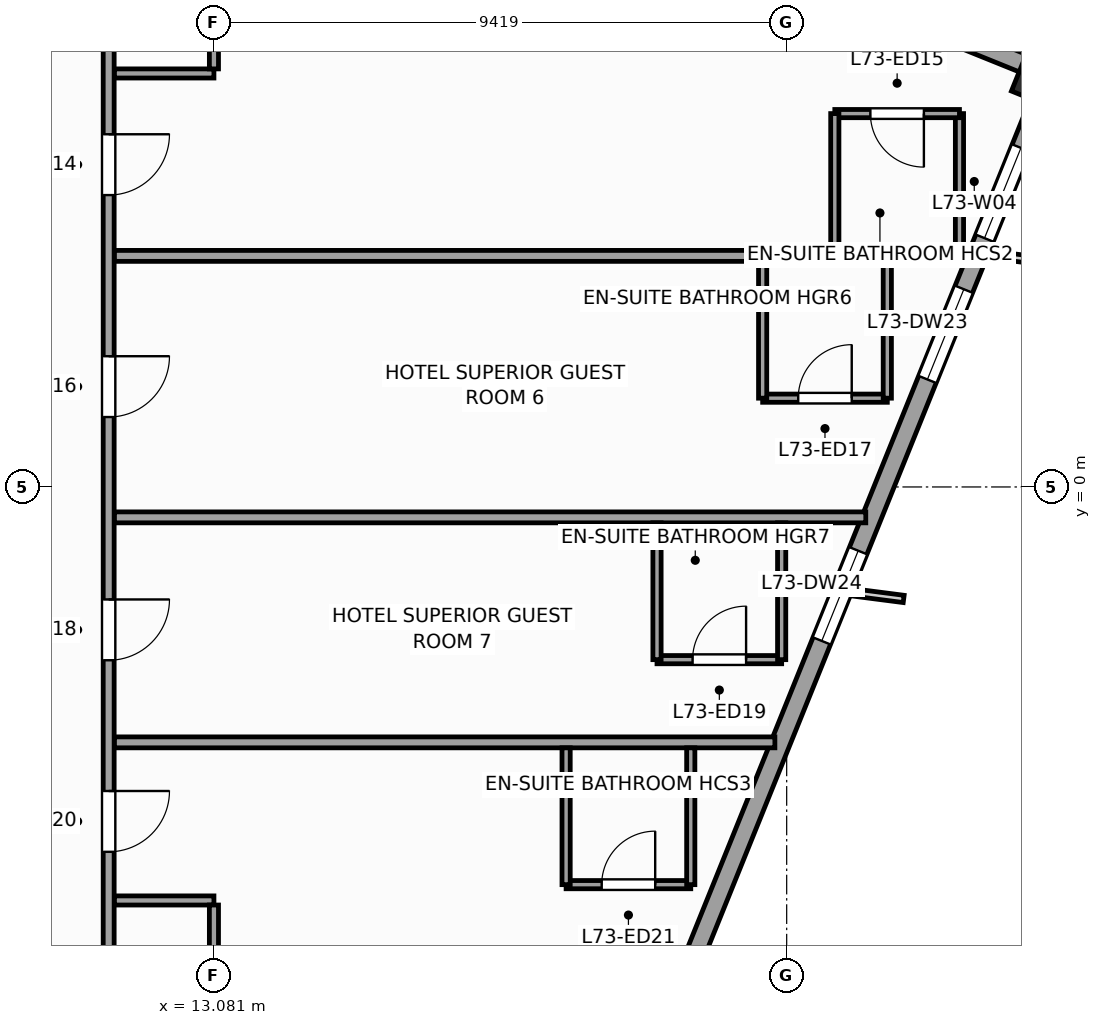
"""IFC4 building model, lengths in metres.
Left out: names, types, materials, properties, quantities, classifications, styles, units other than length and angle.
Written with IfcOpenShell. Run it as: python <this file> out.ifc"""

import sys

from ifc_helpers import new_model, si_unit, direction, frame, frame_2d, origin, origin_2d, place, context, subcontext, project, spatial, rectangle, extrude, source, transform, mapped, element, fill, save


model = new_model("IFC4")
c1 = context("Model", 3, precision=1e-05, world=origin(), true_north=direction((0.0, 1.0)))
c2 = subcontext(c1, "Body", "Model", "MODEL_VIEW")
j1 = project(units=[si_unit("LENGTHUNIT", "METRE"), si_unit("PLANEANGLEUNIT", "RADIAN")], contexts=[c1])
p1 = place(None, origin())
s1 = spatial("IfcSite", under=j1, at=p1, CompositionType="ELEMENT")
p2 = place(p1, origin())
s2 = spatial("IfcBuilding", under=s1, at=p2, CompositionType="ELEMENT")
p3 = place(p2, frame((0.0, 0.0, 297.6)))
s3 = spatial("IfcBuildingStorey", under=s2, at=p3, CompositionType="ELEMENT", Elevation=297.6)
m1 = source(origin(), c2, "Body", "SweptSolid", [
    extrude(rectangle(XDim=0.65, YDim=0.65, at=origin_2d()), origin(), (0.0, 0.0, 1.0), 3.6),
])
p4 = place(p3, frame((26.62, 6.69, 0.0), z_axis=(0.0, 0.0, 1.0), x_axis=(0.374606593416, 0.927183854567, 0.0)))
e1 = element("IfcColumn", 1, at=p4, inside=s3, PredefinedType="COLUMN", context=c2, shape_type="MappedRepresentation", body=[
    mapped(m1, transform((0.0, 0.0, 0.0), scale=1.0)),
])
p5 = place(p3, frame((14.479, -23.813, 0.0), z_axis=(0.0, 0.0, 1.0), x_axis=(0.374609557019, 0.927182657188, 0.0)))
e2 = element("IfcWall", 2, at=p5, inside=s3, PredefinedType="STANDARD", context=c2, shape_type="SweptSolid", body=[
    extrude(rectangle(XDim=33.31, YDim=0.31, at=frame_2d((16.655, 0.0))), origin(), (0.0, 0.0, 1.0), 2.75),
])
p6 = place(p5, frame((3.197, 0.0, 0.47)))
e3 = element("IfcOpeningElement", 3, at=p6, cuts=e2, PredefinedType="OPENING", context=c2, shape_type="SweptSolid", body=[
    extrude(rectangle(XDim=1.6, YDim=2.1, at=frame_2d((0.8, 1.05))), frame((0.0, 0.165, 0.0), z_axis=(0.0, -1.0, 0.0), x_axis=(1.0, 0.0, 0.0)), (0.0, 0.0, 1.0), 0.33),
])
p7 = place(p5, frame((8.86, 0.0, 0.47)))
e4 = element("IfcOpeningElement", 4, at=p7, cuts=e2, PredefinedType="OPENING", context=c2, shape_type="SweptSolid", body=[
    extrude(rectangle(XDim=1.6, YDim=2.1, at=frame_2d((0.8, 1.05))), frame((0.0, 0.165, 0.0), z_axis=(0.0, -1.0, 0.0), x_axis=(1.0, 0.0, 0.0)), (0.0, 0.0, 1.0), 0.33),
])
p8 = place(p5, frame((14.439, 0.0, 0.47)))
e5 = element("IfcOpeningElement", 5, at=p8, cuts=e2, PredefinedType="OPENING", context=c2, shape_type="SweptSolid", body=[
    extrude(rectangle(XDim=1.6, YDim=2.1, at=frame_2d((0.8, 1.05))), frame((0.0, 0.165, 0.0), z_axis=(0.0, -1.0, 0.0), x_axis=(1.0, 0.0, 0.0)), (0.0, 0.0, 1.0), 0.33),
])
p9 = place(p5, frame((30.097, 0.0, 0.47)))
e6 = element("IfcOpeningElement", 6, at=p9, cuts=e2, PredefinedType="OPENING", context=c2, shape_type="SweptSolid", body=[
    extrude(rectangle(XDim=1.6, YDim=2.1, at=frame_2d((0.8, 1.05))), frame((0.0, 0.165, 0.0), z_axis=(0.0, -1.0, 0.0), x_axis=(1.0, 0.0, 0.0)), (0.0, 0.0, 1.0), 0.33),
])
p10 = place(p5, frame((27.59, 0.0, 0.47)))
e7 = element("IfcOpeningElement", 7, at=p10, cuts=e2, PredefinedType="OPENING", context=c2, shape_type="SweptSolid", body=[
    extrude(rectangle(XDim=1.6, YDim=2.1, at=frame_2d((0.8, 1.05))), frame((0.0, 0.165, 0.0), z_axis=(0.0, -1.0, 0.0), x_axis=(1.0, 0.0, 0.0)), (0.0, 0.0, 1.0), 0.33),
])
p11 = place(p5, frame((22.952, 0.0, 0.47)))
e8 = element("IfcOpeningElement", 8, at=p11, cuts=e2, PredefinedType="OPENING", context=c2, shape_type="SweptSolid", body=[
    extrude(rectangle(XDim=1.6, YDim=2.1, at=frame_2d((0.8, 1.05))), frame((0.0, 0.165, 0.0), z_axis=(0.0, -1.0, 0.0), x_axis=(1.0, 0.0, 0.0)), (0.0, 0.0, 1.0), 0.33),
])
p12 = place(p3, frame((26.841, 6.784, 0.0), z_axis=(0.0, 0.0, 1.0), x_axis=(-0.927171722085, 0.374636620962, 0.0)))
e9 = element("IfcWall", 9, at=p12, inside=s3, PredefinedType="STANDARD", context=c2, shape_type="SweptSolid", body=[
    extrude(rectangle(XDim=6.0, YDim=0.31, at=frame_2d((3.0, 0.0))), origin(), (0.0, 0.0, 1.0), 2.65),
])
p13 = place(p3, frame((11.35, -12.35, 0.0), z_axis=(0.0, 0.0, 1.0), x_axis=(0.0, 1.0, 0.0)))
e10 = element("IfcWall", 10, at=p13, inside=s3, PredefinedType="PARTITIONING", context=c2, shape_type="SweptSolid", body=[
    extrude(rectangle(XDim=22.55, YDim=0.18, at=frame_2d((11.275, 0.0))), origin(), (0.0, 0.0, 1.0), 3.35),
])
p14 = place(p13, frame((17.15, 0.0, 0.0)))
e11 = element("IfcOpeningElement", 11, at=p14, cuts=e10, PredefinedType="OPENING", context=c2, shape_type="SweptSolid", body=[
    extrude(rectangle(XDim=1.0, YDim=2.15, at=frame_2d((0.5, 1.075))), frame((0.0, 0.1, 0.0), z_axis=(0.0, -1.0, 0.0), x_axis=(1.0, 0.0, 0.0)), (0.0, 0.0, 1.0), 0.2),
])
p15 = place(p13, frame((13.5, 0.0, 0.0)))
e12 = element("IfcOpeningElement", 12, at=p15, cuts=e10, PredefinedType="OPENING", context=c2, shape_type="SweptSolid", body=[
    extrude(rectangle(XDim=1.0, YDim=2.15, at=frame_2d((0.5, 1.075))), frame((0.0, 0.1, 0.0), z_axis=(0.0, -1.0, 0.0), x_axis=(1.0, 0.0, 0.0)), (0.0, 0.0, 1.0), 0.2),
])
p16 = place(p13, frame((9.5, 0.0, 0.0)))
e13 = element("IfcOpeningElement", 13, at=p16, cuts=e10, PredefinedType="OPENING", context=c2, shape_type="SweptSolid", body=[
    extrude(rectangle(XDim=1.0, YDim=2.15, at=frame_2d((0.5, 1.075))), frame((0.0, 0.1, 0.0), z_axis=(0.0, -1.0, 0.0), x_axis=(1.0, 0.0, 0.0)), (0.0, 0.0, 1.0), 0.2),
])
p17 = place(p13, frame((6.35, 0.0, 0.0)))
e14 = element("IfcOpeningElement", 14, at=p17, cuts=e10, PredefinedType="OPENING", context=c2, shape_type="SweptSolid", body=[
    extrude(rectangle(XDim=1.0, YDim=2.15, at=frame_2d((0.5, 1.075))), frame((0.0, 0.1, 0.0), z_axis=(0.0, -1.0, 0.0), x_axis=(1.0, 0.0, 0.0)), (0.0, 0.0, 1.0), 0.2),
])
p18 = place(p13, frame((2.439, 0.0, 0.0)))
e15 = element("IfcOpeningElement", 15, at=p18, cuts=e10, PredefinedType="OPENING", context=c2, shape_type="SweptSolid", body=[
    extrude(rectangle(XDim=1.0, YDim=2.15, at=frame_2d((0.5, 1.075))), frame((0.0, 0.1, 0.0), z_axis=(0.0, -1.0, 0.0), x_axis=(1.0, 0.0, 0.0)), (0.0, 0.0, 1.0), 0.2),
])
p19 = place(p3, frame((11.445, 3.8, 0.0), z_axis=(0.0, 0.0, 1.0), x_axis=(1.0, 0.0, 0.0)))
e16 = element("IfcWall", 16, at=p19, inside=s3, PredefinedType="PARTITIONING", context=c2, shape_type="SweptSolid", body=[
    extrude(rectangle(XDim=14.093, YDim=0.18, at=frame_2d((7.046, 0.0))), origin(), (0.0, 0.0, 1.0), 3.35),
])
p20 = place(p3, frame((11.445, -0.5, 0.0), z_axis=(0.0, 0.0, 1.0), x_axis=(1.0, 0.0, 0.0)))
e17 = element("IfcWall", 17, at=p20, inside=s3, PredefinedType="PARTITIONING", context=c2, shape_type="SweptSolid", body=[
    extrude(rectangle(XDim=12.356, YDim=0.18, at=frame_2d((6.178, 0.0))), origin(), (0.0, 0.0, 1.0), 3.02),
])
p21 = place(p3, frame((11.445, -4.2, 0.0), z_axis=(0.0, 0.0, 1.0), x_axis=(1.0, 0.0, 0.0)))
e18 = element("IfcWall", 18, at=p21, inside=s3, PredefinedType="PARTITIONING", context=c2, shape_type="SweptSolid", body=[
    extrude(rectangle(XDim=10.861, YDim=0.18, at=frame_2d((5.43, 0.0))), origin(), (0.0, 0.0, 1.0), 3.02),
])
p22 = place(p3, frame((11.445, 6.8, 0.0), z_axis=(0.0, 0.0, 1.0), x_axis=(1.0, 0.0, 0.0)))
e19 = element("IfcWall", 19, at=p22, inside=s3, PredefinedType="PARTITIONING", context=c2, shape_type="SweptSolid", body=[
    extrude(rectangle(XDim=1.636, YDim=0.15, at=frame_2d((0.818, 0.0))), origin(), (0.0, 0.0, 1.0), 3.35),
])
p23 = place(p3, frame((13.081, 6.875, 0.0), z_axis=(0.0, 0.0, 1.0), x_axis=(0.0, 1.0, 0.0)))
e20 = element("IfcWall", 20, at=p23, inside=s3, PredefinedType="PARTITIONING", context=c2, shape_type="SweptSolid", body=[
    extrude(rectangle(XDim=11.843, YDim=0.15, at=frame_2d((5.921, 0.0))), origin(), (0.0, 0.0, 1.0), 2.45),
])
p24 = place(p3, frame((11.445, -6.8, 0.0), z_axis=(0.0, 0.0, 1.0), x_axis=(1.0, 0.0, 0.0)))
e21 = element("IfcWall", 21, at=p24, inside=s3, PredefinedType="PARTITIONING", context=c2, shape_type="SweptSolid", body=[
    extrude(rectangle(XDim=1.636, YDim=0.15, at=frame_2d((0.818, 0.0))), origin(), (0.0, 0.0, 1.0), 3.35),
])
p25 = place(p3, frame((13.081, -6.875, 0.0), z_axis=(0.0, 0.0, 1.0), x_axis=(0.0, -1.0, 0.0)))
e22 = element("IfcWall", 22, at=p25, inside=s3, PredefinedType="PARTITIONING", context=c2, shape_type="SweptSolid", body=[
    extrude(rectangle(XDim=15.942, YDim=0.15, at=frame_2d((7.971, 0.0))), origin(), (0.0, 0.0, 1.0), 2.45),
])
p26 = place(p3, frame((25.342, 3.89, 0.0), z_axis=(0.0, 0.0, 1.0), x_axis=(0.0, 1.0, 0.0)))
e23 = element("IfcWall", 23, at=p26, inside=s3, PredefinedType="PARTITIONING", context=c2, shape_type="SweptSolid", body=[
    extrude(rectangle(XDim=2.25, YDim=0.135, at=frame_2d((1.125, 0.0))), origin(), (0.0, 0.0, 1.0), 2.75),
])
p27 = place(p3, frame((23.292, 6.14, 0.0), z_axis=(0.0, 0.0, 1.0), x_axis=(1.0, 0.0, 0.0)))
e24 = element("IfcWall", 24, at=p27, inside=s3, PredefinedType="PARTITIONING", context=c2, shape_type="SweptSolid", body=[
    extrude(rectangle(XDim=2.05, YDim=0.135, at=frame_2d((1.025, 0.0))), origin(), (0.0, 0.0, 1.0), 3.35),
])
p28 = place(p27, frame((0.585, 0.0, 0.0)))
e25 = element("IfcOpeningElement", 25, at=p28, cuts=e24, PredefinedType="OPENING", context=c2, shape_type="SweptSolid", body=[
    extrude(rectangle(XDim=0.88, YDim=2.1, at=frame_2d((0.44, 1.05))), frame((0.0, 0.078, 0.0), z_axis=(0.0, -1.0, 0.0), x_axis=(1.0, 0.0, 0.0)), (0.0, 0.0, 1.0), 0.155),
])
p29 = place(p3, frame((23.292, 3.89, 0.0), z_axis=(0.0, 0.0, 1.0), x_axis=(0.0, 1.0, 0.0)))
e26 = element("IfcWall", 26, at=p29, inside=s3, PredefinedType="PARTITIONING", context=c2, shape_type="SweptSolid", body=[
    extrude(rectangle(XDim=2.25, YDim=0.135, at=frame_2d((1.125, 0.0))), origin(), (0.0, 0.0, 1.0), 2.95),
])
p30 = place(p3, frame((22.105, 1.46, 0.0), z_axis=(0.0, 0.0, 1.0), x_axis=(1.0, 0.0, 0.0)))
e27 = element("IfcWall", 27, at=p30, inside=s3, PredefinedType="PARTITIONING", context=c2, shape_type="SweptSolid", body=[
    extrude(rectangle(XDim=2.05, YDim=0.135, at=frame_2d((1.025, 0.0))), origin(), (0.0, 0.0, 1.0), 3.35),
])
p31 = place(p30, frame((0.585, 0.0, 0.0)))
e28 = element("IfcOpeningElement", 28, at=p31, cuts=e27, PredefinedType="OPENING", context=c2, shape_type="SweptSolid", body=[
    extrude(rectangle(XDim=0.88, YDim=2.1, at=frame_2d((0.44, 1.05))), frame((0.0, 0.078, 0.0), z_axis=(0.0, -1.0, 0.0), x_axis=(1.0, 0.0, 0.0)), (0.0, 0.0, 1.0), 0.155),
])
for number, where, z_axis, x_axis in (
    (29, (24.155, 1.46, 0.0), (0.0, 0.0, 1.0), (0.0, 1.0, 0.0)),
    (30, (22.105, 1.46, 0.0), (0.0, 0.0, 1.0), (0.0, 1.0, 0.0)),
):
    element("IfcWall", number, at=place(p3, frame(where, z_axis=z_axis, x_axis=x_axis)), inside=s3, PredefinedType="PARTITIONING", context=c2, shape_type="SweptSolid", body=[
        extrude(rectangle(XDim=2.25, YDim=0.135, at=frame_2d((1.125, 0.0))), origin(), (0.0, 0.0, 1.0), 3.35),
    ])
p32 = place(p3, frame((20.367, -2.84, 0.0), z_axis=(0.0, 0.0, 1.0), x_axis=(1.0, 0.0, 0.0)))
e31 = element("IfcWall", 31, at=p32, inside=s3, PredefinedType="PARTITIONING", context=c2, shape_type="SweptSolid", body=[
    extrude(rectangle(XDim=2.05, YDim=0.135, at=frame_2d((1.025, 0.0))), origin(), (0.0, 0.0, 1.0), 3.35),
])
p33 = place(p32, frame((0.585, 0.0, 0.0)))
e32 = element("IfcOpeningElement", 32, at=p33, cuts=e31, PredefinedType="OPENING", context=c2, shape_type="SweptSolid", body=[
    extrude(rectangle(XDim=0.88, YDim=2.1, at=frame_2d((0.44, 1.05))), frame((0.0, 0.078, 0.0), z_axis=(0.0, -1.0, 0.0), x_axis=(1.0, 0.0, 0.0)), (0.0, 0.0, 1.0), 0.155),
])
for number, where, z_axis, x_axis in (
    (33, (22.417, -2.84, 0.0), (0.0, 0.0, 1.0), (0.0, 1.0, 0.0)),
    (34, (20.367, -2.84, 0.0), (0.0, 0.0, 1.0), (0.0, 1.0, 0.0)),
):
    element("IfcWall", number, at=place(p3, frame(where, z_axis=z_axis, x_axis=x_axis)), inside=s3, PredefinedType="PARTITIONING", context=c2, shape_type="SweptSolid", body=[
        extrude(rectangle(XDim=2.25, YDim=0.135, at=frame_2d((1.125, 0.0))), origin(), (0.0, 0.0, 1.0), 3.35),
    ])
p34 = place(p3, frame((18.873, -6.54, 0.0), z_axis=(0.0, 0.0, 1.0), x_axis=(1.0, 0.0, 0.0)))
e35 = element("IfcWall", 35, at=p34, inside=s3, PredefinedType="PARTITIONING", context=c2, shape_type="SweptSolid", body=[
    extrude(rectangle(XDim=2.05, YDim=0.135, at=frame_2d((1.025, 0.0))), origin(), (0.0, 0.0, 1.0), 3.35),
])
p35 = place(p34, frame((0.585, 0.0, 0.0)))
e36 = element("IfcOpeningElement", 36, at=p35, cuts=e35, PredefinedType="OPENING", context=c2, shape_type="SweptSolid", body=[
    extrude(rectangle(XDim=0.88, YDim=2.1, at=frame_2d((0.44, 1.05))), frame((0.0, 0.078, 0.0), z_axis=(0.0, -1.0, 0.0), x_axis=(1.0, 0.0, 0.0)), (0.0, 0.0, 1.0), 0.155),
])
for number, where, z_axis, x_axis in (
    (37, (20.923, -6.54, 0.0), (0.0, 0.0, 1.0), (0.0, 1.0, 0.0)),
    (38, (18.873, -6.54, 0.0), (0.0, 0.0, 1.0), (0.0, 1.0, 0.0)),
):
    element("IfcWall", number, at=place(p3, frame(where, z_axis=z_axis, x_axis=x_axis)), inside=s3, PredefinedType="PARTITIONING", context=c2, shape_type="SweptSolid", body=[
        extrude(rectangle(XDim=2.25, YDim=0.135, at=frame_2d((1.125, 0.0))), origin(), (0.0, 0.0, 1.0), 3.35),
    ])
m2 = source(origin(), c2, "Body", "SweptSolid", [
    extrude(rectangle(XDim=1.6, YDim=2.1, at=frame_2d((0.8, 1.05))), frame((0.0, 0.03, 0.0), z_axis=(0.0, -1.0, 0.0), x_axis=(1.0, 0.0, 0.0)), (0.0, 0.0, 1.0), 0.06),
])
p36 = place(p9, origin())
e39 = element("IfcWindow", 39, at=p36, inside=s3, PartitioningType="SINGLE_PANEL", PredefinedType="WINDOW", context=c2, shape_type="MappedRepresentation", body=[
    mapped(m2, transform((0.0, 0.0, 0.0), scale=1.0)),
])
fill(e6, e39)
m3 = source(origin(), c2, "Body", "SweptSolid", [
    extrude(rectangle(XDim=1.0, YDim=2.15, at=frame_2d((0.5, 1.075))), frame((0.0, 0.025, 0.0), z_axis=(0.0, -1.0, 0.0), x_axis=(1.0, 0.0, 0.0)), (0.0, 0.0, 1.0), 0.05),
])
p37 = place(p14, frame((1.0, 0.0, 0.0), z_axis=(0.0, 0.0, 1.0), x_axis=(-1.0, 0.0, 0.0)))
e40 = element("IfcDoor", 40, at=p37, inside=s3, OperationType="SINGLE_SWING_RIGHT", PredefinedType="DOOR", context=c2, shape_type="MappedRepresentation", body=[
    mapped(m3, transform((0.0, 0.0, 0.0), scale=1.0)),
])
fill(e11, e40)
m4 = source(origin(), c2, "Body", "SweptSolid", [
    extrude(rectangle(XDim=0.88, YDim=2.1, at=frame_2d((0.44, 1.05))), frame((0.0, 0.025, 0.0), z_axis=(0.0, -1.0, 0.0), x_axis=(1.0, 0.0, 0.0)), (0.0, 0.0, 1.0), 0.05),
])
p38 = place(p28, frame((0.88, 0.0, 0.0), z_axis=(0.0, 0.0, 1.0), x_axis=(-1.0, 0.0, 0.0)))
e41 = element("IfcDoor", 41, at=p38, inside=s3, OperationType="SINGLE_SWING_RIGHT", PredefinedType="DOOR", context=c2, shape_type="MappedRepresentation", body=[
    mapped(m4, transform((0.0, 0.0, 0.0), scale=1.0)),
])
fill(e25, e41)
p39 = place(p15, frame((1.0, 0.0, 0.0), z_axis=(0.0, 0.0, 1.0), x_axis=(-1.0, 0.0, 0.0)))
e42 = element("IfcDoor", 42, at=p39, inside=s3, OperationType="SINGLE_SWING_RIGHT", PredefinedType="DOOR", context=c2, shape_type="MappedRepresentation", body=[
    mapped(m3, transform((0.0, 0.0, 0.0), scale=1.0)),
])
fill(e12, e42)
p40 = place(p31, origin())
e43 = element("IfcDoor", 43, at=p40, inside=s3, OperationType="SINGLE_SWING_RIGHT", PredefinedType="DOOR", context=c2, shape_type="MappedRepresentation", body=[
    mapped(m4, transform((0.0, 0.0, 0.0), scale=1.0)),
])
fill(e28, e43)
p41 = place(p16, frame((1.0, 0.0, 0.0), z_axis=(0.0, 0.0, 1.0), x_axis=(-1.0, 0.0, 0.0)))
e44 = element("IfcDoor", 44, at=p41, inside=s3, OperationType="SINGLE_SWING_RIGHT", PredefinedType="DOOR", context=c2, shape_type="MappedRepresentation", body=[
    mapped(m3, transform((0.0, 0.0, 0.0), scale=1.0)),
])
fill(e13, e44)
p42 = place(p33, origin())
e45 = element("IfcDoor", 45, at=p42, inside=s3, OperationType="SINGLE_SWING_RIGHT", PredefinedType="DOOR", context=c2, shape_type="MappedRepresentation", body=[
    mapped(m4, transform((0.0, 0.0, 0.0), scale=1.0)),
])
fill(e32, e45)
p43 = place(p17, frame((1.0, 0.0, 0.0), z_axis=(0.0, 0.0, 1.0), x_axis=(-1.0, 0.0, 0.0)))
e46 = element("IfcDoor", 46, at=p43, inside=s3, OperationType="SINGLE_SWING_RIGHT", PredefinedType="DOOR", context=c2, shape_type="MappedRepresentation", body=[
    mapped(m3, transform((0.0, 0.0, 0.0), scale=1.0)),
])
fill(e14, e46)
p44 = place(p35, origin())
e47 = element("IfcDoor", 47, at=p44, inside=s3, OperationType="SINGLE_SWING_RIGHT", PredefinedType="DOOR", context=c2, shape_type="MappedRepresentation", body=[
    mapped(m4, transform((0.0, 0.0, 0.0), scale=1.0)),
])
fill(e36, e47)
p45 = place(p10, origin())
e48 = element("IfcWindow", 48, at=p45, inside=s3, PartitioningType="SINGLE_PANEL", PredefinedType="WINDOW", context=c2, shape_type="MappedRepresentation", body=[
    mapped(m2, transform((0.0, 0.0, 0.0), scale=1.0)),
])
fill(e7, e48)
p46 = place(p11, origin())
e49 = element("IfcWindow", 49, at=p46, inside=s3, PartitioningType="SINGLE_PANEL", PredefinedType="WINDOW", context=c2, shape_type="MappedRepresentation", body=[
    mapped(m2, transform((0.0, 0.0, 0.0), scale=1.0)),
])
fill(e8, e49)
save(model, sys.argv[1])
